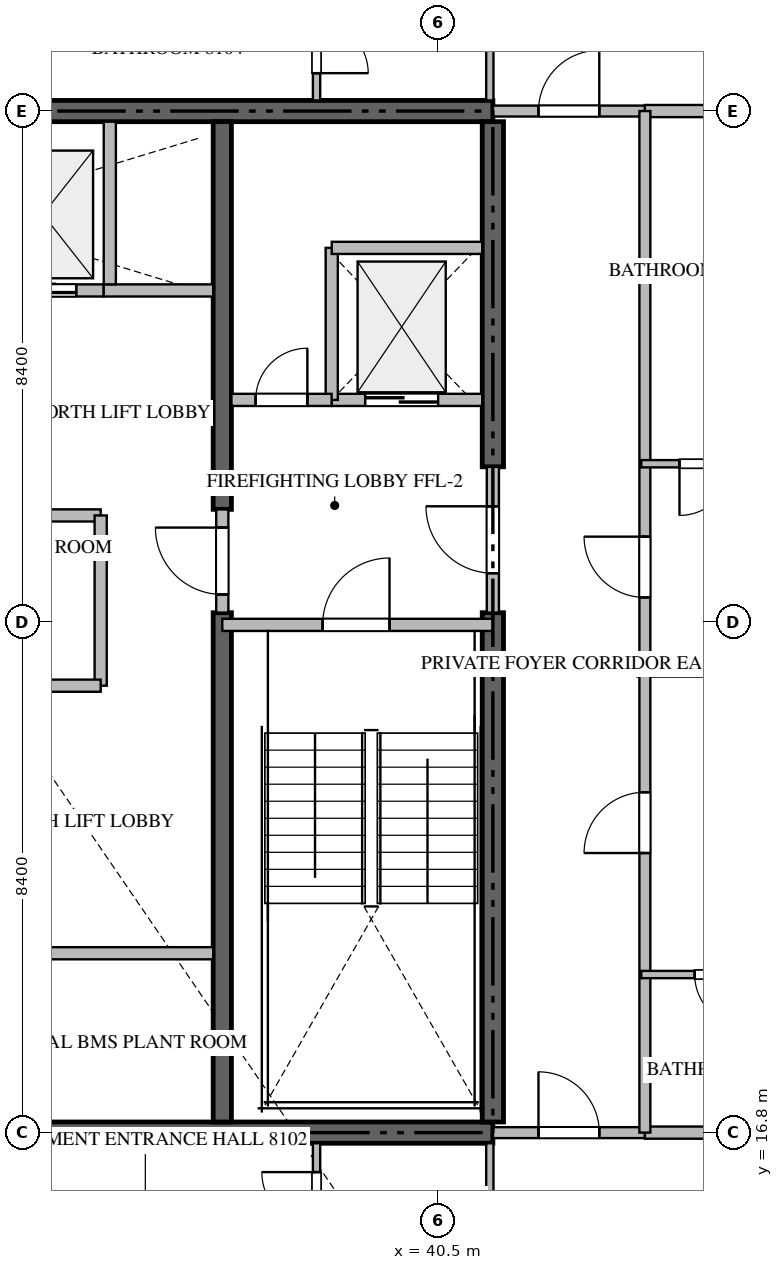
"""IFC4 building model, lengths in metres.
Left out: names, types, materials, properties, quantities, classifications, styles, units other than length and angle.
Written with IfcOpenShell. Run it as: python <this file> out.ifc"""

import sys

from ifc_helpers import new_model, si_unit, direction, frame, frame_2d, origin, place, context, subcontext, project, spatial, rectangle, extrude, source, transform, mapped, element, fill, save


model = new_model("IFC4")
c1 = context("Model", 3, precision=1e-05, world=origin(), true_north=direction((0.0, 1.0)))
c2 = subcontext(c1, "Body", "Model", "MODEL_VIEW")
j1 = project(units=[si_unit("LENGTHUNIT", "METRE"), si_unit("PLANEANGLEUNIT", "RADIAN")], contexts=[c1])
p1 = place(None, origin())
s1 = spatial("IfcSite", under=j1, at=p1, CompositionType="ELEMENT")
p2 = place(p1, origin())
s2 = spatial("IfcBuilding", under=s1, at=p2, CompositionType="ELEMENT")
p3 = place(p2, frame((0.0, 0.0, 325.85)))
s3 = spatial("IfcBuildingStorey", under=s2, at=p3, CompositionType="ELEMENT", Elevation=325.85)
for number, where, z_axis, x_axis in (
    (1, (23.4, 16.8, -0.26), (0.0, 0.0, 1.0), (1.0, 0.0, 0.0)),
    (2, (41.4, 33.6, -0.26), (0.0, 0.0, 1.0), (-1.0, 0.0, 0.0)),
):
    element("IfcWall", number, at=place(p3, frame(where, z_axis=z_axis, x_axis=x_axis)), inside=s3, PredefinedType="SHEAR", context=c2, shape_type="SweptSolid", body=[
        extrude(rectangle(XDim=18.0, YDim=0.35, at=frame_2d((9.0, 0.0))), origin(), (0.0, 0.0, 1.0), 4.048),
    ])
p4 = place(p3, frame((41.4, 16.975, -0.26), z_axis=(0.0, 0.0, 1.0), x_axis=(0.0, 1.0, 0.0)))
e3 = element("IfcWall", 3, at=p4, inside=s3, PredefinedType="SHEAR", context=c2, shape_type="SweptSolid", body=[
    extrude(rectangle(XDim=8.375, YDim=0.35, at=frame_2d((4.188, 0.0))), origin(), (0.0, 0.0, 1.0), 4.048),
])
p5 = place(p3, frame((41.4, 27.75, -0.26), z_axis=(0.0, 0.0, 1.0), x_axis=(0.0, 1.0, 0.0)))
e4 = element("IfcWall", 4, at=p5, inside=s3, PredefinedType="SHEAR", context=c2, shape_type="SweptSolid", body=[
    extrude(rectangle(XDim=5.675, YDim=0.35, at=frame_2d((2.837, 0.0))), origin(), (0.0, 0.0, 1.0), 4.048),
])
p6 = place(p3, frame((36.95, 16.975, -0.26), z_axis=(0.0, 0.0, 1.0), x_axis=(0.0, 1.0, 0.0)))
e5 = element("IfcWall", 5, at=p6, inside=s3, PredefinedType="SHEAR", context=c2, shape_type="SweptSolid", body=[
    extrude(rectangle(XDim=8.375, YDim=0.3, at=frame_2d((4.188, 0.0))), origin(), (0.0, 0.0, 1.0), 4.048),
])
p7 = place(p3, frame((36.95, 27.05, -0.26), z_axis=(0.0, 0.0, 1.0), x_axis=(0.0, 1.0, 0.0)))
e6 = element("IfcWall", 6, at=p7, inside=s3, PredefinedType="SHEAR", context=c2, shape_type="SweptSolid", body=[
    extrude(rectangle(XDim=6.375, YDim=0.3, at=frame_2d((3.188, 0.0))), origin(), (0.0, 0.0, 1.0), 4.048),
])
p8 = place(p3, frame((36.95, 25.15, 0.0), z_axis=(0.0, 0.0, 1.0), x_axis=(1.0, 0.0, 0.0)))
e7 = element("IfcWall", 7, at=p8, inside=s3, PredefinedType="STANDARD", context=c2, shape_type="SweptSolid", body=[
    extrude(rectangle(XDim=4.45, YDim=0.2, at=frame_2d((2.225, 0.0))), origin(), (0.0, 0.0, 1.0), 3.79),
])
p9 = place(p8, frame((1.65, 0.0, 0.0)))
e8 = element("IfcOpeningElement", 8, at=p9, cuts=e7, PredefinedType="OPENING", context=c2, shape_type="SweptSolid", body=[
    extrude(rectangle(XDim=1.1, YDim=2.15, at=frame_2d((0.55, 1.075))), frame((0.0, 0.11, 0.0), z_axis=(0.0, -1.0, 0.0), x_axis=(1.0, 0.0, 0.0)), (0.0, 0.0, 1.0), 0.22),
])
p10 = place(p3, frame((38.75, 28.85, 0.0), z_axis=(0.0, 0.0, 1.0), x_axis=(1.0, 0.0, 0.0)))
e9 = element("IfcWall", 9, at=p10, inside=s3, PredefinedType="STANDARD", context=c2, shape_type="SweptSolid", body=[
    extrude(rectangle(XDim=2.475, YDim=0.2, at=frame_2d((1.238, 0.0))), origin(), (0.0, 0.0, 1.0), 3.79),
])
p11 = place(p10, frame((0.55, 0.0, 0.0)))
e10 = element("IfcOpeningElement", 10, at=p11, cuts=e9, PredefinedType="OPENING", context=c2, shape_type="SweptSolid", body=[
    extrude(rectangle(XDim=1.2, YDim=2.2, at=frame_2d((0.6, 1.1))), frame((0.0, 0.11, 0.0), z_axis=(0.0, -1.0, 0.0), x_axis=(1.0, 0.0, 0.0)), (0.0, 0.0, 1.0), 0.22),
])
p12 = place(p3, frame((32.85, 30.65, 0.0), z_axis=(0.0, 0.0, 1.0), x_axis=(1.0, 0.0, 0.0)))
e11 = element("IfcWall", 11, at=p12, inside=s3, PredefinedType="STANDARD", context=c2, shape_type="SweptSolid", body=[
    extrude(rectangle(XDim=2.15, YDim=0.2, at=frame_2d((1.075, 0.0))), origin(), (0.0, 0.0, 1.0), 3.79),
])
p13 = place(p12, frame((0.6, 0.0, 0.0)))
e12 = element("IfcOpeningElement", 12, at=p13, cuts=e11, PredefinedType="OPENING", context=c2, shape_type="SweptSolid", body=[
    extrude(rectangle(XDim=1.1, YDim=2.2, at=frame_2d((0.55, 1.1))), frame((0.0, 0.11, 0.0), z_axis=(0.0, -1.0, 0.0), x_axis=(1.0, 0.0, 0.0)), (0.0, 0.0, 1.0), 0.22),
])
p14 = place(p3, frame((35.0, 30.65, 0.0), z_axis=(0.0, 0.0, 1.0), x_axis=(1.0, 0.0, 0.0)))
e13 = element("IfcWall", 13, at=p14, inside=s3, PredefinedType="STANDARD", context=c2, shape_type="SweptSolid", body=[
    extrude(rectangle(XDim=1.8, YDim=0.2, at=frame_2d((0.9, 0.0))), origin(), (0.0, 0.0, 1.0), 3.79),
])
p15 = place(p3, frame((35.1, 30.75, 0.0), z_axis=(0.0, 0.0, 1.0), x_axis=(0.0, 1.0, 0.0)))
e14 = element("IfcWall", 14, at=p15, inside=s3, PredefinedType="STANDARD", context=c2, shape_type="SweptSolid", body=[
    extrude(rectangle(XDim=2.675, YDim=0.2, at=frame_2d((1.337, 0.0))), origin(), (0.0, 0.0, 1.0), 3.79),
])
p16 = place(p3, frame((38.75, 28.85, 0.0), z_axis=(0.0, 0.0, 1.0), x_axis=(0.0, 1.0, 0.0)))
e15 = element("IfcWall", 15, at=p16, inside=s3, PredefinedType="STANDARD", context=c2, shape_type="SweptSolid", body=[
    extrude(rectangle(XDim=2.5, YDim=0.2, at=frame_2d((1.25, 0.0))), origin(), (0.0, 0.0, 1.0), 3.79),
])
p17 = place(p3, frame((38.75, 31.35, 0.0), z_axis=(0.0, 0.0, 1.0), x_axis=(1.0, 0.0, 0.0)))
e16 = element("IfcWall", 16, at=p17, inside=s3, PredefinedType="STANDARD", context=c2, shape_type="SweptSolid", body=[
    extrude(rectangle(XDim=2.475, YDim=0.2, at=frame_2d((1.238, 0.0))), origin(), (0.0, 0.0, 1.0), 3.79),
])
p18 = place(p3, frame((37.1, 28.85, 0.0), z_axis=(0.0, 0.0, 1.0), x_axis=(1.0, 0.0, 0.0)))
e17 = element("IfcWall", 17, at=p18, inside=s3, PredefinedType="STANDARD", context=c2, shape_type="SweptSolid", body=[
    extrude(rectangle(XDim=1.648, YDim=0.2, at=frame_2d((0.824, 0.0))), origin(), (0.0, 0.0, 1.0), 3.79),
])
p19 = place(p18, frame((0.399, 0.0, 0.0)))
e18 = element("IfcOpeningElement", 18, at=p19, cuts=e17, PredefinedType="OPENING", context=c2, shape_type="SweptSolid", body=[
    extrude(rectangle(XDim=0.85, YDim=2.1, at=frame_2d((0.425, 1.05))), frame((0.0, 0.11, 0.0), z_axis=(0.0, -1.0, 0.0), x_axis=(1.0, 0.0, 0.0)), (0.0, 0.0, 1.0), 0.22),
])
p20 = place(p3, frame((41.4, 25.352, 0.0), z_axis=(0.0, 0.0, 1.0), x_axis=(0.0, 1.0, 0.0)))
e19 = element("IfcWall", 19, at=p20, inside=s3, PredefinedType="STANDARD", context=c2, shape_type="SweptSolid", body=[
    extrude(rectangle(XDim=2.396, YDim=0.2, at=frame_2d((1.198, 0.0))), origin(), (0.0, 0.0, 1.0), 3.79),
])
p21 = place(p20, frame((0.648, 0.0, 0.0)))
e20 = element("IfcOpeningElement", 20, at=p21, cuts=e19, PredefinedType="OPENING", context=c2, shape_type="SweptSolid", body=[
    extrude(rectangle(XDim=1.1, YDim=2.15, at=frame_2d((0.55, 1.075))), frame((0.0, 0.11, 0.0), z_axis=(0.0, -1.0, 0.0), x_axis=(1.0, 0.0, 0.0)), (0.0, 0.0, 1.0), 0.22),
])
p22 = place(p3, frame((36.95, 25.352, 0.0), z_axis=(0.0, 0.0, 1.0), x_axis=(0.0, 1.0, 0.0)))
e21 = element("IfcWall", 21, at=p22, inside=s3, PredefinedType="STANDARD", context=c2, shape_type="SweptSolid", body=[
    extrude(rectangle(XDim=1.696, YDim=0.2, at=frame_2d((0.848, 0.0))), origin(), (0.0, 0.0, 1.0), 3.79),
])
p23 = place(p22, frame((0.298, 0.0, 0.0)))
e22 = element("IfcOpeningElement", 22, at=p23, cuts=e21, PredefinedType="OPENING", context=c2, shape_type="SweptSolid", body=[
    extrude(rectangle(XDim=1.1, YDim=2.15, at=frame_2d((0.55, 1.075))), frame((0.0, 0.11, 0.0), z_axis=(0.0, -1.0, 0.0), x_axis=(1.0, 0.0, 0.0)), (0.0, 0.0, 1.0), 0.22),
])
p24 = place(p3, frame((28.0, 19.75, 0.0), z_axis=(0.0, 0.0, 1.0), x_axis=(1.0, 0.0, 0.0)))
e23 = element("IfcWall", 23, at=p24, inside=s3, PredefinedType="STANDARD", context=c2, shape_type="SweptSolid", body=[
    extrude(rectangle(XDim=8.8, YDim=0.2, at=frame_2d((4.4, 0.0))), origin(), (0.0, 0.0, 1.0), 3.79),
])
p25 = place(p24, frame((3.95, 0.0, 0.0)))
e24 = element("IfcOpeningElement", 24, at=p25, cuts=e23, PredefinedType="OPENING", context=c2, shape_type="SweptSolid", body=[
    extrude(rectangle(XDim=0.9, YDim=2.1, at=frame_2d((0.45, 1.05))), frame((0.0, 0.11, 0.0), z_axis=(0.0, -1.0, 0.0), x_axis=(1.0, 0.0, 0.0)), (0.0, 0.0, 1.0), 0.22),
])
p26 = place(p3, frame((28.0, 26.95, 0.0), z_axis=(0.0, 0.0, 1.0), x_axis=(1.0, 0.0, 0.0)))
e25 = element("IfcWall", 25, at=p26, inside=s3, PredefinedType="STANDARD", context=c2, shape_type="SweptSolid", body=[
    extrude(rectangle(XDim=6.95, YDim=0.2, at=frame_2d((3.475, 0.0))), origin(), (0.0, 0.0, 1.0), 3.79),
])
p27 = place(p3, frame((34.95, 24.15, 0.0), z_axis=(0.0, 0.0, 1.0), x_axis=(0.0, 1.0, 0.0)))
e26 = element("IfcWall", 26, at=p27, inside=s3, PredefinedType="STANDARD", context=c2, shape_type="SweptSolid", body=[
    extrude(rectangle(XDim=2.8, YDim=0.2, at=frame_2d((1.4, 0.0))), origin(), (0.0, 0.0, 1.0), 3.79),
])
p28 = place(p3, frame((31.452, 24.15, 0.0), z_axis=(0.0, 0.0, 1.0), x_axis=(1.0, 0.0, 0.0)))
e27 = element("IfcWall", 27, at=p28, inside=s3, PredefinedType="STANDARD", context=c2, shape_type="SweptSolid", body=[
    extrude(rectangle(XDim=3.498, YDim=0.2, at=frame_2d((1.749, 0.0))), origin(), (0.0, 0.0, 1.0), 3.79),
])
p29 = place(p28, frame((1.324, 0.0, 0.0)))
e28 = element("IfcOpeningElement", 28, at=p29, cuts=e27, PredefinedType="OPENING", context=c2, shape_type="SweptSolid", body=[
    extrude(rectangle(XDim=0.85, YDim=2.1, at=frame_2d((0.425, 1.05))), frame((0.0, 0.11, 0.0), z_axis=(0.0, -1.0, 0.0), x_axis=(1.0, 0.0, 0.0)), (0.0, 0.0, 1.0), 0.22),
])
p30 = place(p3, frame((43.78, 24.4, 0.0), z_axis=(0.0, 0.0, 1.0), x_axis=(1.0, 0.0, 0.0)))
e29 = element("IfcWall", 29, at=p30, inside=s3, PredefinedType="PARTITIONING", context=c2, shape_type="SweptSolid", body=[
    extrude(rectangle(XDim=11.738, YDim=0.2, at=frame_2d((5.869, 0.0))), origin(), (0.0, 0.0, 1.0), 3.79),
])
for number, where, z_axis, x_axis in (
    (30, (43.9, 16.8, 0.0), (0.0, 0.0, 1.0), (1.0, 0.0, 0.0)),
    (31, (43.9, 33.6, 0.0), (0.0, 0.0, 1.0), (1.0, 0.0, 0.0)),
):
    element("IfcWall", number, at=place(p3, frame(where, z_axis=z_axis, x_axis=x_axis)), inside=s3, PredefinedType="PARTITIONING", context=c2, shape_type="SweptSolid", body=[
        extrude(rectangle(XDim=11.618, YDim=0.2, at=frame_2d((5.809, 0.0))), origin(), (0.0, 0.0, 1.0), 3.79),
    ])
p31 = place(p3, frame((41.402, 16.8, 0.0), z_axis=(0.0, 0.0, 1.0), x_axis=(1.0, 0.0, 0.0)))
e32 = element("IfcWall", 32, at=p31, inside=s3, PredefinedType="PARTITIONING", context=c2, shape_type="SweptSolid", body=[
    extrude(rectangle(XDim=2.496, YDim=0.18, at=frame_2d((1.248, 0.0))), origin(), (0.0, 0.0, 1.0), 3.79),
])
p32 = place(p31, frame((0.748, 0.0, 0.0)))
e33 = element("IfcOpeningElement", 33, at=p32, cuts=e32, PredefinedType="OPENING", context=c2, shape_type="SweptSolid", body=[
    extrude(rectangle(XDim=1.0, YDim=2.15, at=frame_2d((0.5, 1.075))), frame((0.0, 0.1, 0.0), z_axis=(0.0, -1.0, 0.0), x_axis=(1.0, 0.0, 0.0)), (0.0, 0.0, 1.0), 0.2),
])
p33 = place(p3, frame((41.402, 33.6, 0.0), z_axis=(0.0, 0.0, 1.0), x_axis=(1.0, 0.0, 0.0)))
e34 = element("IfcWall", 34, at=p33, inside=s3, PredefinedType="PARTITIONING", context=c2, shape_type="SweptSolid", body=[
    extrude(rectangle(XDim=2.496, YDim=0.18, at=frame_2d((1.248, 0.0))), origin(), (0.0, 0.0, 1.0), 3.79),
])
p34 = place(p33, frame((0.748, 0.0, 0.0)))
e35 = element("IfcOpeningElement", 35, at=p34, cuts=e34, PredefinedType="OPENING", context=c2, shape_type="SweptSolid", body=[
    extrude(rectangle(XDim=1.0, YDim=2.15, at=frame_2d((0.5, 1.075))), frame((0.0, 0.1, 0.0), z_axis=(0.0, -1.0, 0.0), x_axis=(1.0, 0.0, 0.0)), (0.0, 0.0, 1.0), 0.2),
])
p35 = place(p3, frame((43.9, 16.8, 0.0), z_axis=(0.0, 0.0, 1.0), x_axis=(0.0, 1.0, 0.0)))
e36 = element("IfcWall", 36, at=p35, inside=s3, PredefinedType="PARTITIONING", context=c2, shape_type="SweptSolid", body=[
    extrude(rectangle(XDim=16.8, YDim=0.18, at=frame_2d((8.4, 0.0))), origin(), (0.0, 0.0, 1.0), 3.79),
])
p36 = place(p35, frame((4.598, 0.0, 0.0)))
e37 = element("IfcOpeningElement", 37, at=p36, cuts=e36, PredefinedType="OPENING", context=c2, shape_type="SweptSolid", body=[
    extrude(rectangle(XDim=1.0, YDim=2.15, at=frame_2d((0.5, 1.075))), frame((0.0, 0.1, 0.0), z_axis=(0.0, -1.0, 0.0), x_axis=(1.0, 0.0, 0.0)), (0.0, 0.0, 1.0), 0.2),
])
p37 = place(p35, frame((8.801, 0.0, 0.0)))
e38 = element("IfcOpeningElement", 38, at=p37, cuts=e36, PredefinedType="OPENING", context=c2, shape_type="SweptSolid", body=[
    extrude(rectangle(XDim=1.0, YDim=2.15, at=frame_2d((0.5, 1.075))), frame((0.0, 0.1, 0.0), z_axis=(0.0, -1.0, 0.0), x_axis=(1.0, 0.0, 0.0)), (0.0, 0.0, 1.0), 0.2),
])
p38 = place(p3, frame((41.35, 14.05, 0.0), z_axis=(0.0, 0.0, 1.0), x_axis=(0.0, 1.0, 0.0)))
e39 = element("IfcWall", 39, at=p38, inside=s3, PredefinedType="PARTITIONING", context=c2, shape_type="SweptSolid", body=[
    extrude(rectangle(XDim=2.575, YDim=0.12, at=frame_2d((1.288, 0.0))), origin(), (0.0, 0.0, 1.0), 3.79),
])
p39 = place(p3, frame((38.5, 14.65, 0.0), z_axis=(0.0, 0.0, 1.0), x_axis=(0.0, 1.0, 0.0)))
e40 = element("IfcWall", 40, at=p39, inside=s3, PredefinedType="PARTITIONING", context=c2, shape_type="SweptSolid", body=[
    extrude(rectangle(XDim=1.975, YDim=0.12, at=frame_2d((0.988, 0.0))), origin(), (0.0, 0.0, 1.0), 3.79),
])
p40 = place(p39, frame((0.601, 0.0, 0.0)))
e41 = element("IfcOpeningElement", 41, at=p40, cuts=e40, PredefinedType="OPENING", context=c2, shape_type="SweptSolid", body=[
    extrude(rectangle(XDim=0.9, YDim=2.1, at=frame_2d((0.45, 1.05))), frame((0.0, 0.07, 0.0), z_axis=(0.0, -1.0, 0.0), x_axis=(1.0, 0.0, 0.0)), (0.0, 0.0, 1.0), 0.14),
])
p41 = place(p3, frame((41.35, 36.35, 0.0), z_axis=(0.0, 0.0, 1.0), x_axis=(0.0, -1.0, 0.0)))
e42 = element("IfcWall", 42, at=p41, inside=s3, PredefinedType="PARTITIONING", context=c2, shape_type="SweptSolid", body=[
    extrude(rectangle(XDim=2.575, YDim=0.12, at=frame_2d((1.288, 0.0))), origin(), (0.0, 0.0, 1.0), 3.79),
])
p42 = place(p3, frame((38.5, 35.648, 0.0), z_axis=(0.0, 0.0, 1.0), x_axis=(0.0, -1.0, 0.0)))
e43 = element("IfcWall", 43, at=p42, inside=s3, PredefinedType="PARTITIONING", context=c2, shape_type="SweptSolid", body=[
    extrude(rectangle(XDim=1.873, YDim=0.12, at=frame_2d((0.937, 0.0))), origin(), (0.0, 0.0, 1.0), 3.79),
])
p43 = place(p42, frame((0.575, 0.0, 0.0)))
e44 = element("IfcOpeningElement", 44, at=p43, cuts=e43, PredefinedType="OPENING", context=c2, shape_type="SweptSolid", body=[
    extrude(rectangle(XDim=0.85, YDim=2.1, at=frame_2d((0.425, 1.05))), frame((0.0, 0.07, 0.0), z_axis=(0.0, -1.0, 0.0), x_axis=(1.0, 0.0, 0.0)), (0.0, 0.0, 1.0), 0.14),
])
p44 = place(p3, frame((46.448, 19.4, 0.0), z_axis=(0.0, 0.0, 1.0), x_axis=(-1.0, 0.0, 0.0)))
e45 = element("IfcWall", 45, at=p44, inside=s3, PredefinedType="PARTITIONING", context=c2, shape_type="SweptSolid", body=[
    extrude(rectangle(XDim=2.608, YDim=0.12, at=frame_2d((1.304, 0.0))), origin(), (0.0, 0.0, 1.0), 3.79),
])
p45 = place(p44, frame((0.879, 0.0, 0.0)))
e46 = element("IfcOpeningElement", 46, at=p45, cuts=e45, PredefinedType="OPENING", context=c2, shape_type="SweptSolid", body=[
    extrude(rectangle(XDim=0.85, YDim=2.1, at=frame_2d((0.425, 1.05))), frame((0.0, 0.07, 0.0), z_axis=(0.0, -1.0, 0.0), x_axis=(1.0, 0.0, 0.0)), (0.0, 0.0, 1.0), 0.14),
])
p46 = place(p3, frame((45.948, 27.8, 0.0), z_axis=(0.0, 0.0, 1.0), x_axis=(-1.0, 0.0, 0.0)))
e47 = element("IfcWall", 47, at=p46, inside=s3, PredefinedType="PARTITIONING", context=c2, shape_type="SweptSolid", body=[
    extrude(rectangle(XDim=2.108, YDim=0.12, at=frame_2d((1.054, 0.0))), origin(), (0.0, 0.0, 1.0), 3.79),
])
p47 = place(p46, frame((0.629, 0.0, 0.0)))
e48 = element("IfcOpeningElement", 48, at=p47, cuts=e47, PredefinedType="OPENING", context=c2, shape_type="SweptSolid", body=[
    extrude(rectangle(XDim=0.85, YDim=2.1, at=frame_2d((0.425, 1.05))), frame((0.0, 0.07, 0.0), z_axis=(0.0, -1.0, 0.0), x_axis=(1.0, 0.0, 0.0)), (0.0, 0.0, 1.0), 0.14),
])
m1 = source(origin(), c2, "Body", "SweptSolid", [
    extrude(rectangle(XDim=1.1, YDim=2.15, at=frame_2d((0.55, 1.075))), frame((0.0, 0.025, 0.0), z_axis=(0.0, -1.0, 0.0), x_axis=(1.0, 0.0, 0.0)), (0.0, 0.0, 1.0), 0.05),
])
p48 = place(p9, origin())
e49 = element("IfcDoor", 49, at=p48, inside=s3, OperationType="SINGLE_SWING_RIGHT", PredefinedType="DOOR", context=c2, shape_type="MappedRepresentation", body=[
    mapped(m1, transform((0.0, 0.0, 0.0), scale=1.0)),
])
fill(e8, e49)
m2 = source(origin(), c2, "Body", "SweptSolid", [
    extrude(rectangle(XDim=1.2, YDim=2.2, at=frame_2d((0.6, 1.1))), frame((0.0, 0.025, 0.0), z_axis=(0.0, -1.0, 0.0), x_axis=(1.0, 0.0, 0.0)), (0.0, 0.0, 1.0), 0.05),
])
p49 = place(p11, origin())
e50 = element("IfcDoor", 50, at=p49, inside=s3, OperationType="DOUBLE_DOOR_SLIDING", PredefinedType="DOOR", context=c2, shape_type="MappedRepresentation", body=[
    mapped(m2, transform((0.0, 0.0, 0.0), scale=1.0)),
])
fill(e10, e50)
m3 = source(origin(), c2, "Body", "SweptSolid", [
    extrude(rectangle(XDim=1.1, YDim=2.2, at=frame_2d((0.55, 1.1))), frame((0.0, 0.025, 0.0), z_axis=(0.0, -1.0, 0.0), x_axis=(1.0, 0.0, 0.0)), (0.0, 0.0, 1.0), 0.05),
])
p50 = place(p13, origin())
e51 = element("IfcDoor", 51, at=p50, inside=s3, OperationType="DOUBLE_DOOR_SLIDING", PredefinedType="DOOR", context=c2, shape_type="MappedRepresentation", body=[
    mapped(m3, transform((0.0, 0.0, 0.0), scale=1.0)),
])
fill(e12, e51)
m4 = source(origin(), c2, "Body", "SweptSolid", [
    extrude(rectangle(XDim=0.85, YDim=2.1, at=frame_2d((0.425, 1.05))), frame((0.0, 0.025, 0.0), z_axis=(0.0, -1.0, 0.0), x_axis=(1.0, 0.0, 0.0)), (0.0, 0.0, 1.0), 0.05),
])
p51 = place(p19, origin())
e52 = element("IfcDoor", 52, at=p51, inside=s3, OperationType="SINGLE_SWING_RIGHT", PredefinedType="DOOR", context=c2, shape_type="MappedRepresentation", body=[
    mapped(m4, transform((0.0, 0.0, 0.0), scale=1.0)),
])
fill(e18, e52)
p52 = place(p21, origin())
e53 = element("IfcDoor", 53, at=p52, inside=s3, OperationType="SINGLE_SWING_RIGHT", PredefinedType="DOOR", context=c2, shape_type="MappedRepresentation", body=[
    mapped(m1, transform((0.0, 0.0, 0.0), scale=1.0)),
])
fill(e20, e53)
p53 = place(p23, origin())
e54 = element("IfcDoor", 54, at=p53, inside=s3, OperationType="SINGLE_SWING_RIGHT", PredefinedType="DOOR", context=c2, shape_type="MappedRepresentation", body=[
    mapped(m1, transform((0.0, 0.0, 0.0), scale=1.0)),
])
fill(e22, e54)
m5 = source(origin(), c2, "Body", "SweptSolid", [
    extrude(rectangle(XDim=1.0, YDim=2.15, at=frame_2d((0.5, 1.075))), frame((0.0, 0.025, 0.0), z_axis=(0.0, -1.0, 0.0), x_axis=(1.0, 0.0, 0.0)), (0.0, 0.0, 1.0), 0.05),
])
p54 = place(p32, origin())
e55 = element("IfcDoor", 55, at=p54, inside=s3, OperationType="SINGLE_SWING_LEFT", PredefinedType="DOOR", context=c2, shape_type="MappedRepresentation", body=[
    mapped(m5, transform((0.0, 0.0, 0.0), scale=1.0)),
])
fill(e33, e55)
p55 = place(p34, origin())
e56 = element("IfcDoor", 56, at=p55, inside=s3, OperationType="SINGLE_SWING_RIGHT", PredefinedType="DOOR", context=c2, shape_type="MappedRepresentation", body=[
    mapped(m5, transform((0.0, 0.0, 0.0), scale=1.0)),
])
fill(e35, e56)
p56 = place(p36, origin())
e57 = element("IfcDoor", 57, at=p56, inside=s3, OperationType="SINGLE_SWING_LEFT", PredefinedType="DOOR", context=c2, shape_type="MappedRepresentation", body=[
    mapped(m5, transform((0.0, 0.0, 0.0), scale=1.0)),
])
fill(e37, e57)
p57 = place(p37, origin())
e58 = element("IfcDoor", 58, at=p57, inside=s3, OperationType="SINGLE_SWING_RIGHT", PredefinedType="DOOR", context=c2, shape_type="MappedRepresentation", body=[
    mapped(m5, transform((0.0, 0.0, 0.0), scale=1.0)),
])
fill(e38, e58)
m6 = source(origin(), c2, "Body", "SweptSolid", [
    extrude(rectangle(XDim=0.9, YDim=2.1, at=frame_2d((0.45, 1.05))), frame((0.0, 0.025, 0.0), z_axis=(0.0, -1.0, 0.0), x_axis=(1.0, 0.0, 0.0)), (0.0, 0.0, 1.0), 0.05),
])
p58 = place(p40, origin())
e59 = element("IfcDoor", 59, at=p58, inside=s3, OperationType="SINGLE_SWING_RIGHT", PredefinedType="DOOR", context=c2, shape_type="MappedRepresentation", body=[
    mapped(m6, transform((0.0, 0.0, 0.0), scale=1.0)),
])
fill(e41, e59)
p59 = place(p43, origin())
e60 = element("IfcDoor", 60, at=p59, inside=s3, OperationType="SINGLE_SWING_RIGHT", PredefinedType="DOOR", context=c2, shape_type="MappedRepresentation", body=[
    mapped(m4, transform((0.0, 0.0, 0.0), scale=1.0)),
])
fill(e44, e60)
p60 = place(p45, origin())
e61 = element("IfcDoor", 61, at=p60, inside=s3, OperationType="SINGLE_SWING_LEFT", PredefinedType="DOOR", context=c2, shape_type="MappedRepresentation", body=[
    mapped(m4, transform((0.0, 0.0, 0.0), scale=1.0)),
])
fill(e46, e61)
p61 = place(p47, origin())
e62 = element("IfcDoor", 62, at=p61, inside=s3, OperationType="SINGLE_SWING_RIGHT", PredefinedType="DOOR", context=c2, shape_type="MappedRepresentation", body=[
    mapped(m4, transform((0.0, 0.0, 0.0), scale=1.0)),
])
fill(e48, e62)
save(model, sys.argv[1])
